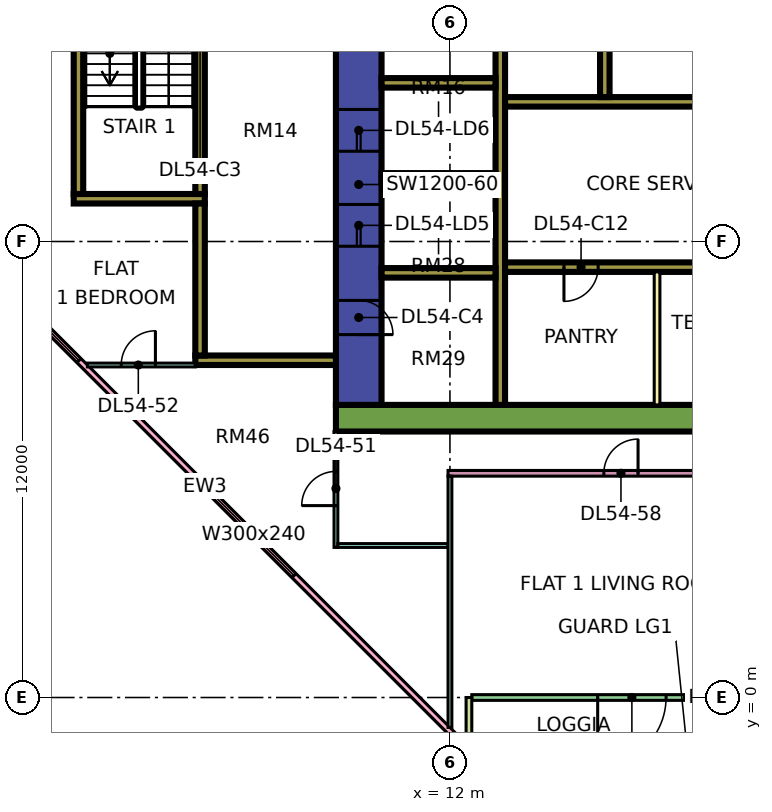
"""IFC4 building model, lengths in metres.
Left out: names, types, materials, properties, quantities, classifications, styles, units other than length and angle.
Written with IfcOpenShell. Run it as: python <this file> out.ifc"""

import sys

from ifc_helpers import new_model, si_unit, direction, frame, frame_2d, origin, place, context, subcontext, project, spatial, rectangle, extrude, element, fill, save


model = new_model("IFC4")
c1 = context("Model", 3, precision=1e-05, world=origin(), true_north=direction((0.0, 1.0)))
c2 = subcontext(c1, "Body", "Model", "MODEL_VIEW")
j1 = project(units=[si_unit("LENGTHUNIT", "METRE"), si_unit("PLANEANGLEUNIT", "RADIAN")], contexts=[c1])
p1 = place(None, origin())
s1 = spatial("IfcSite", under=j1, at=p1, CompositionType="ELEMENT")
p2 = place(p1, origin())
s2 = spatial("IfcBuilding", under=s1, at=p2, CompositionType="ELEMENT")
p3 = place(p2, frame((0.0, 0.0, 230.4)))
s3 = spatial("IfcBuildingStorey", under=s2, at=p3, CompositionType="ELEMENT", Elevation=230.4)
p4 = place(p3, frame((9.0, 7.35, 0.0), z_axis=(0.0, 0.0, 1.0), x_axis=(1.0, 0.0, 0.0)))
e1 = element("IfcWall", 1, at=p4, inside=s3, PredefinedType="SHEAR", context=c2, shape_type="SweptSolid", body=[
    extrude(rectangle(XDim=25.0, YDim=0.7, at=frame_2d((12.5, 0.0))), origin(), (0.0, 0.0, 1.0), 3.75),
])
p5 = place(p3, frame((9.6, 7.7, 0.0), z_axis=(0.0, 0.0, 1.0), x_axis=(0.0, 1.0, 0.0)))
e2 = element("IfcWall", 2, at=p5, inside=s3, PredefinedType="SHEAR", context=c2, shape_type="SweptSolid", body=[
    extrude(rectangle(XDim=11.6, YDim=1.2, at=frame_2d((5.8, 0.0))), origin(), (0.0, 0.0, 1.0), 3.75),
])
p6 = place(p5, frame((4.175, 0.0, 0.0)))
e3 = element("IfcOpeningElement", 3, at=p6, cuts=e2, PredefinedType="OPENING", context=c2, shape_type="SweptSolid", body=[
    extrude(rectangle(XDim=1.1, YDim=2.2, at=frame_2d((0.55, 1.1))), frame((0.0, 0.61, 0.0), z_axis=(0.0, -1.0, 0.0), x_axis=(1.0, 0.0, 0.0)), (0.0, 0.0, 1.0), 1.22),
])
p7 = place(p5, frame((6.675, 0.0, 0.0)))
e4 = element("IfcOpeningElement", 4, at=p7, cuts=e2, PredefinedType="OPENING", context=c2, shape_type="SweptSolid", body=[
    extrude(rectangle(XDim=1.1, YDim=2.2, at=frame_2d((0.55, 1.1))), frame((0.0, 0.61, 0.0), z_axis=(0.0, -1.0, 0.0), x_axis=(1.0, 0.0, 0.0)), (0.0, 0.0, 1.0), 1.22),
])
p8 = place(p5, frame((9.55, 0.0, 0.0)))
e5 = element("IfcOpeningElement", 5, at=p8, cuts=e2, PredefinedType="OPENING", context=c2, shape_type="SweptSolid", body=[
    extrude(rectangle(XDim=1.1, YDim=2.2, at=frame_2d((0.55, 1.1))), frame((0.0, 0.61, 0.0), z_axis=(0.0, -1.0, 0.0), x_axis=(1.0, 0.0, 0.0)), (0.0, 0.0, 1.0), 1.22),
])
p9 = place(p5, frame((1.85, 0.0, 0.0)))
e6 = element("IfcOpeningElement", 6, at=p9, cuts=e2, PredefinedType="OPENING", context=c2, shape_type="SweptSolid", body=[
    extrude(rectangle(XDim=0.9, YDim=2.1, at=frame_2d((0.45, 1.05))), frame((0.0, 0.61, 0.0), z_axis=(0.0, -1.0, 0.0), x_axis=(1.0, 0.0, 0.0)), (0.0, 0.0, 1.0), 1.22),
])
p10 = place(p3, frame((13.325, 7.7, 0.0), z_axis=(0.0, 0.0, 1.0), x_axis=(0.0, 1.0, 0.0)))
e7 = element("IfcWall", 7, at=p10, inside=s3, PredefinedType="SHEAR", context=c2, shape_type="SweptSolid", body=[
    extrude(rectangle(XDim=11.6, YDim=0.25, at=frame_2d((5.8, 0.0))), origin(), (0.0, 0.0, 1.0), 3.75),
])
p11 = place(p3, frame((13.45, 11.325, 0.0), z_axis=(0.0, 0.0, 1.0), x_axis=(1.0, 0.0, 0.0)))
e8 = element("IfcWall", 8, at=p11, inside=s3, PredefinedType="SHEAR", context=c2, shape_type="SweptSolid", body=[
    extrude(rectangle(XDim=19.85, YDim=0.25, at=frame_2d((9.925, 0.0))), origin(), (0.0, 0.0, 1.0), 3.75),
])
p12 = place(p11, frame((11.65, 0.0, 0.0)))
e9 = element("IfcOpeningElement", 9, at=p12, cuts=e8, PredefinedType="OPENING", context=c2, shape_type="SweptSolid", body=[
    extrude(rectangle(XDim=1.2, YDim=2.2, at=frame_2d((0.6, 1.1))), frame((0.0, 0.135, 0.0), z_axis=(0.0, -1.0, 0.0), x_axis=(1.0, 0.0, 0.0)), (0.0, 0.0, 1.0), 0.27),
])
p13 = place(p11, frame((14.4, 0.0, 0.0)))
e10 = element("IfcOpeningElement", 10, at=p13, cuts=e8, PredefinedType="OPENING", context=c2, shape_type="SweptSolid", body=[
    extrude(rectangle(XDim=1.2, YDim=2.2, at=frame_2d((0.6, 1.1))), frame((0.0, 0.135, 0.0), z_axis=(0.0, -1.0, 0.0), x_axis=(1.0, 0.0, 0.0)), (0.0, 0.0, 1.0), 0.27),
])
p14 = place(p11, frame((17.15, 0.0, 0.0)))
e11 = element("IfcOpeningElement", 11, at=p14, cuts=e8, PredefinedType="OPENING", context=c2, shape_type="SweptSolid", body=[
    extrude(rectangle(XDim=1.2, YDim=2.2, at=frame_2d((0.6, 1.1))), frame((0.0, 0.135, 0.0), z_axis=(0.0, -1.0, 0.0), x_axis=(1.0, 0.0, 0.0)), (0.0, 0.0, 1.0), 0.27),
])
p15 = place(p11, frame((1.55, 0.0, 0.0)))
e12 = element("IfcOpeningElement", 12, at=p15, cuts=e8, PredefinedType="OPENING", context=c2, shape_type="SweptSolid", body=[
    extrude(rectangle(XDim=0.9, YDim=2.1, at=frame_2d((0.45, 1.05))), frame((0.0, 0.135, 0.0), z_axis=(0.0, -1.0, 0.0), x_axis=(1.0, 0.0, 0.0)), (0.0, 0.0, 1.0), 0.27),
])
p16 = place(p11, frame((6.925, 0.0, 0.0)))
e13 = element("IfcOpeningElement", 13, at=p16, cuts=e8, PredefinedType="OPENING", context=c2, shape_type="SweptSolid", body=[
    extrude(rectangle(XDim=0.9, YDim=2.1, at=frame_2d((0.45, 1.05))), frame((0.0, 0.135, 0.0), z_axis=(0.0, -1.0, 0.0), x_axis=(1.0, 0.0, 0.0)), (0.0, 0.0, 1.0), 0.27),
])
p17 = place(p3, frame((13.45, 15.675, 0.0), z_axis=(0.0, 0.0, 1.0), x_axis=(1.0, 0.0, 0.0)))
e14 = element("IfcWall", 14, at=p17, inside=s3, PredefinedType="SHEAR", context=c2, shape_type="SweptSolid", body=[
    extrude(rectangle(XDim=13.75, YDim=0.25, at=frame_2d((6.875, 0.0))), origin(), (0.0, 0.0, 1.0), 3.75),
])
p18 = place(p17, frame((11.65, 0.0, 0.0)))
e15 = element("IfcOpeningElement", 15, at=p18, cuts=e14, PredefinedType="OPENING", context=c2, shape_type="SweptSolid", body=[
    extrude(rectangle(XDim=1.2, YDim=2.2, at=frame_2d((0.6, 1.1))), frame((0.0, 0.135, 0.0), z_axis=(0.0, -1.0, 0.0), x_axis=(1.0, 0.0, 0.0)), (0.0, 0.0, 1.0), 0.27),
])
for number, where, z_axis, x_axis in (
    (16, (10.2, 11.175, 0.0), (0.0, 0.0, 1.0), (1.0, 0.0, 0.0)),
    (17, (10.2, 13.675, 0.0), (0.0, 0.0, 1.0), (1.0, 0.0, 0.0)),
    (18, (10.2, 16.175, 0.0), (0.0, 0.0, 1.0), (1.0, 0.0, 0.0)),
):
    element("IfcWall", number, at=place(p3, frame(where, z_axis=z_axis, x_axis=x_axis)), inside=s3, PredefinedType="SHEAR", context=c2, shape_type="SweptSolid", body=[
        extrude(rectangle(XDim=3.0, YDim=0.25, at=frame_2d((1.5, 0.0))), origin(), (0.0, 0.0, 1.0), 3.75),
    ])
p19 = place(p3, frame((16.075, 15.8, 0.0), z_axis=(0.0, 0.0, 1.0), x_axis=(0.0, 1.0, 0.0)))
e19 = element("IfcWall", 19, at=p19, inside=s3, PredefinedType="SHEAR", context=c2, shape_type="SweptSolid", body=[
    extrude(rectangle(XDim=3.5, YDim=0.25, at=frame_2d((1.75, 0.0))), origin(), (0.0, 0.0, 1.0), 3.75),
])
p20 = place(p3, frame((2.1, 13.125, 0.0), z_axis=(0.0, 0.0, 1.0), x_axis=(1.0, 0.0, 0.0)))
e20 = element("IfcWall", 20, at=p20, inside=s3, PredefinedType="SHEAR", context=c2, shape_type="SweptSolid", body=[
    extrude(rectangle(XDim=3.45, YDim=0.25, at=frame_2d((1.725, 0.0))), origin(), (0.0, 0.0, 1.0), 3.75),
])
p21 = place(p3, frame((2.225, 13.25, 0.0), z_axis=(0.0, 0.0, 1.0), x_axis=(0.0, 1.0, 0.0)))
e21 = element("IfcWall", 21, at=p21, inside=s3, PredefinedType="SHEAR", context=c2, shape_type="SweptSolid", body=[
    extrude(rectangle(XDim=6.5, YDim=0.25, at=frame_2d((3.25, 0.0))), origin(), (0.0, 0.0, 1.0), 3.75),
])
p22 = place(p3, frame((5.425, 13.25, 0.0), z_axis=(0.0, 0.0, 1.0), x_axis=(0.0, 1.0, 0.0)))
e22 = element("IfcWall", 22, at=p22, inside=s3, PredefinedType="SHEAR", context=c2, shape_type="SweptSolid", body=[
    extrude(rectangle(XDim=6.5, YDim=0.25, at=frame_2d((3.25, 0.0))), origin(), (0.0, 0.0, 1.0), 3.75),
])
p23 = place(p22, frame((5.25, 0.0, 0.0)))
e23 = element("IfcOpeningElement", 23, at=p23, cuts=e22, PredefinedType="OPENING", context=c2, shape_type="SweptSolid", body=[
    extrude(rectangle(XDim=1.1, YDim=2.2, at=frame_2d((0.55, 1.1))), frame((0.0, 0.135, 0.0), z_axis=(0.0, -1.0, 0.0), x_axis=(1.0, 0.0, 0.0)), (0.0, 0.0, 1.0), 0.27),
])
p24 = place(p3, frame((5.3, 8.875, 0.0), z_axis=(0.0, 0.0, 1.0), x_axis=(1.0, 0.0, 0.0)))
e24 = element("IfcWall", 24, at=p24, inside=s3, PredefinedType="SHEAR", context=c2, shape_type="SweptSolid", body=[
    extrude(rectangle(XDim=3.7, YDim=0.25, at=frame_2d((1.85, 0.0))), origin(), (0.0, 0.0, 1.0), 3.75),
])
p25 = place(p3, frame((5.425, 9.0, 0.0), z_axis=(0.0, 0.0, 1.0), x_axis=(0.0, 1.0, 0.0)))
e25 = element("IfcWall", 25, at=p25, inside=s3, PredefinedType="SHEAR", context=c2, shape_type="SweptSolid", body=[
    extrude(rectangle(XDim=4.0, YDim=0.25, at=frame_2d((2.0, 0.0))), origin(), (0.0, 0.0, 1.0), 3.75),
])
p26 = place(p3, frame((-1.447, 12.553, 0.0), z_axis=(0.0, 0.0, 1.0), x_axis=(0.707106781187, -0.707106781187, 0.0)))
e26 = element("IfcWall", 26, at=p26, inside=s3, PredefinedType="SOLIDWALL", context=c2, shape_type="SweptSolid", body=[
    extrude(rectangle(XDim=19.799, YDim=0.15, at=frame_2d((9.899, 0.0))), origin(), (0.0, 0.0, 1.0), 3.35),
])
p27 = place(p26, frame((2.212, 0.0, 0.45)))
e27 = element("IfcOpeningElement", 27, at=p27, cuts=e26, PredefinedType="OPENING", context=c2, shape_type="SweptSolid", body=[
    extrude(rectangle(XDim=3.0, YDim=2.4, at=frame_2d((1.5, 1.2))), frame((0.0, 0.085, 0.0), z_axis=(0.0, -1.0, 0.0), x_axis=(1.0, 0.0, 0.0)), (0.0, 0.0, 1.0), 0.17),
])
p28 = place(p26, frame((10.216, 0.0, 0.45)))
e28 = element("IfcOpeningElement", 28, at=p28, cuts=e26, PredefinedType="OPENING", context=c2, shape_type="SweptSolid", body=[
    extrude(rectangle(XDim=3.0, YDim=2.4, at=frame_2d((1.5, 1.2))), frame((0.0, 0.085, 0.0), z_axis=(0.0, -1.0, 0.0), x_axis=(1.0, 0.0, 0.0)), (0.0, 0.0, 1.0), 0.17),
])
p29 = place(p3, frame((12.575, 0.0, 0.0), z_axis=(0.0, 0.0, 1.0), x_axis=(1.0, 0.0, 0.0)))
e29 = element("IfcWall", 29, at=p29, inside=s3, PredefinedType="SOLIDWALL", context=c2, shape_type="SweptSolid", body=[
    extrude(rectangle(XDim=11.35, YDim=0.15, at=frame_2d((5.675, 0.0))), origin(), (0.0, 0.0, 1.0), 3.35),
])
p30 = place(p29, frame((3.312, 0.0, 0.0)))
e30 = element("IfcOpeningElement", 30, at=p30, cuts=e29, PredefinedType="OPENING", context=c2, shape_type="SweptSolid", body=[
    extrude(rectangle(XDim=1.8, YDim=2.4, at=frame_2d((0.9, 1.2))), frame((0.0, 0.085, 0.0), z_axis=(0.0, -1.0, 0.0), x_axis=(1.0, 0.0, 0.0)), (0.0, 0.0, 1.0), 0.17),
])
p31 = place(p29, frame((9.062, 0.0, 0.45)))
e31 = element("IfcOpeningElement", 31, at=p31, cuts=e29, PredefinedType="OPENING", context=c2, shape_type="SweptSolid", body=[
    extrude(rectangle(XDim=1.2, YDim=2.4, at=frame_2d((0.6, 1.2))), frame((0.0, 0.085, 0.0), z_axis=(0.0, -1.0, 0.0), x_axis=(1.0, 0.0, 0.0)), (0.0, 0.0, 1.0), 0.17),
])
p32 = place(p3, frame((12.5, -1.5, 0.0), z_axis=(0.0, 0.0, 1.0), x_axis=(0.0, 1.0, 0.0)))
e32 = element("IfcWall", 32, at=p32, inside=s3, PredefinedType="SOLIDWALL", context=c2, shape_type="SweptSolid", body=[
    extrude(rectangle(XDim=1.5, YDim=0.15, at=frame_2d((0.75, 0.0))), origin(), (0.0, 0.0, 1.0), 3.35),
])
p33 = place(p3, frame((17.45, 7.7, 0.0), z_axis=(0.0, 0.0, 1.0), x_axis=(0.0, 1.0, 0.0)))
e33 = element("IfcWall", 33, at=p33, inside=s3, PredefinedType="PARTITIONING", context=c2, shape_type="SweptSolid", body=[
    extrude(rectangle(XDim=3.5, YDim=0.15, at=frame_2d((1.75, 0.0))), origin(), (0.0, 0.0, 1.0), 3.35),
])
p34 = place(p3, frame((2.461, 8.75, 0.0), z_axis=(0.0, 0.0, 1.0), x_axis=(1.0, 0.0, 0.0)))
e34 = element("IfcWall", 34, at=p34, inside=s3, PredefinedType="PARTITIONING", context=c2, shape_type="SweptSolid", body=[
    extrude(rectangle(XDim=2.839, YDim=0.1, at=frame_2d((1.419, 0.0))), origin(), (0.0, 0.0, 1.0), 3.35),
])
p35 = place(p34, frame((0.889, 0.0, 0.0)))
e35 = element("IfcOpeningElement", 35, at=p35, cuts=e34, PredefinedType="OPENING", context=c2, shape_type="SweptSolid", body=[
    extrude(rectangle(XDim=0.9, YDim=2.1, at=frame_2d((0.45, 1.05))), frame((0.0, 0.06, 0.0), z_axis=(0.0, -1.0, 0.0), x_axis=(1.0, 0.0, 0.0)), (0.0, 0.0, 1.0), 0.12),
])
p36 = place(p3, frame((9.0, 3.95, 0.0), z_axis=(0.0, 0.0, 1.0), x_axis=(0.0, 1.0, 0.0)))
e36 = element("IfcWall", 36, at=p36, inside=s3, PredefinedType="PARTITIONING", context=c2, shape_type="SweptSolid", body=[
    extrude(rectangle(XDim=3.05, YDim=0.1, at=frame_2d((1.525, 0.0))), origin(), (0.0, 0.0, 1.0), 3.35),
])
p37 = place(p36, frame((1.1, 0.0, 0.0)))
e37 = element("IfcOpeningElement", 37, at=p37, cuts=e36, PredefinedType="OPENING", context=c2, shape_type="SweptSolid", body=[
    extrude(rectangle(XDim=0.9, YDim=2.1, at=frame_2d((0.45, 1.05))), frame((0.0, 0.06, 0.0), z_axis=(0.0, -1.0, 0.0), x_axis=(1.0, 0.0, 0.0)), (0.0, 0.0, 1.0), 0.12),
])
p38 = place(p3, frame((9.05, 4.0, 0.0), z_axis=(0.0, 0.0, 1.0), x_axis=(1.0, 0.0, 0.0)))
e38 = element("IfcWall", 38, at=p38, inside=s3, PredefinedType="PARTITIONING", context=c2, shape_type="SweptSolid", body=[
    extrude(rectangle(XDim=2.9, YDim=0.1, at=frame_2d((1.45, 0.0))), origin(), (0.0, 0.0, 1.0), 3.35),
])
p39 = place(p3, frame((11.95, 5.9, 0.0), z_axis=(0.0, 0.0, 1.0), x_axis=(1.0, 0.0, 0.0)))
e39 = element("IfcWall", 39, at=p39, inside=s3, PredefinedType="PARTITIONING", context=c2, shape_type="SweptSolid", body=[
    extrude(rectangle(XDim=21.1, YDim=0.15, at=frame_2d((10.55, 0.0))), origin(), (0.0, 0.0, 1.0), 3.35),
])
p40 = place(p39, frame((10.1, 0.0, 0.0)))
e40 = element("IfcOpeningElement", 40, at=p40, cuts=e39, PredefinedType="OPENING", context=c2, shape_type="SweptSolid", body=[
    extrude(rectangle(XDim=0.9, YDim=2.1, at=frame_2d((0.45, 1.05))), frame((0.0, 0.085, 0.0), z_axis=(0.0, -1.0, 0.0), x_axis=(1.0, 0.0, 0.0)), (0.0, 0.0, 1.0), 0.17),
])
p41 = place(p39, frame((16.1, 0.0, 0.0)))
e41 = element("IfcOpeningElement", 41, at=p41, cuts=e39, PredefinedType="OPENING", context=c2, shape_type="SweptSolid", body=[
    extrude(rectangle(XDim=0.9, YDim=2.1, at=frame_2d((0.45, 1.05))), frame((0.0, 0.085, 0.0), z_axis=(0.0, -1.0, 0.0), x_axis=(1.0, 0.0, 0.0)), (0.0, 0.0, 1.0), 0.17),
])
p42 = place(p39, frame((4.1, 0.0, 0.0)))
e42 = element("IfcOpeningElement", 42, at=p42, cuts=e39, PredefinedType="OPENING", context=c2, shape_type="SweptSolid", body=[
    extrude(rectangle(XDim=0.9, YDim=2.1, at=frame_2d((0.45, 1.05))), frame((0.0, 0.085, 0.0), z_axis=(0.0, -1.0, 0.0), x_axis=(1.0, 0.0, 0.0)), (0.0, 0.0, 1.0), 0.17),
])
p43 = place(p3, frame((12.0, -0.788, 0.0), z_axis=(0.0, 0.0, 1.0), x_axis=(0.0, 1.0, 0.0)))
e43 = element("IfcWall", 43, at=p43, inside=s3, PredefinedType="PARTITIONING", context=c2, shape_type="SweptSolid", body=[
    extrude(rectangle(XDim=6.613, YDim=0.1, at=frame_2d((3.306, 0.0))), origin(), (0.0, 0.0, 1.0), 3.35),
])
p44 = place(p27, origin())
e44 = element("IfcWindow", 44, at=p44, inside=s3, PartitioningType="SINGLE_PANEL", PredefinedType="WINDOW", context=c2, shape_type="SweptSolid", body=[
    extrude(rectangle(XDim=3.0, YDim=2.4, at=frame_2d((1.5, 1.2))), frame((0.0, 0.03, 0.0), z_axis=(0.0, -1.0, 0.0), x_axis=(1.0, 0.0, 0.0)), (0.0, 0.0, 1.0), 0.06),
])
fill(e27, e44)
p45 = place(p28, origin())
e45 = element("IfcWindow", 45, at=p45, inside=s3, PartitioningType="SINGLE_PANEL", PredefinedType="WINDOW", context=c2, shape_type="SweptSolid", body=[
    extrude(rectangle(XDim=3.0, YDim=2.4, at=frame_2d((1.5, 1.2))), frame((0.0, 0.03, 0.0), z_axis=(0.0, -1.0, 0.0), x_axis=(1.0, 0.0, 0.0)), (0.0, 0.0, 1.0), 0.06),
])
fill(e28, e45)
p46 = place(p30, frame((1.8, 0.0, 0.0), z_axis=(0.0, 0.0, 1.0), x_axis=(-1.0, 0.0, 0.0)))
e46 = element("IfcDoor", 46, at=p46, inside=s3, OperationType="DOUBLE_DOOR_SINGLE_SWING", PredefinedType="DOOR", context=c2, shape_type="SweptSolid", body=[
    extrude(rectangle(XDim=1.8, YDim=2.4, at=frame_2d((0.9, 1.2))), frame((0.0, 0.025, 0.0), z_axis=(0.0, -1.0, 0.0), x_axis=(1.0, 0.0, 0.0)), (0.0, 0.0, 1.0), 0.05),
])
fill(e30, e46)
p47 = place(p6, origin())
e47 = element("IfcDoor", 47, at=p47, inside=s3, OperationType="DOUBLE_DOOR_SLIDING", PredefinedType="DOOR", context=c2, shape_type="SweptSolid", body=[
    extrude(rectangle(XDim=1.1, YDim=2.2, at=frame_2d((0.55, 1.1))), frame((0.0, 0.025, 0.0), z_axis=(0.0, -1.0, 0.0), x_axis=(1.0, 0.0, 0.0)), (0.0, 0.0, 1.0), 0.05),
])
fill(e3, e47)
p48 = place(p7, origin())
e48 = element("IfcDoor", 48, at=p48, inside=s3, OperationType="DOUBLE_DOOR_SLIDING", PredefinedType="DOOR", context=c2, shape_type="SweptSolid", body=[
    extrude(rectangle(XDim=1.1, YDim=2.2, at=frame_2d((0.55, 1.1))), frame((0.0, 0.025, 0.0), z_axis=(0.0, -1.0, 0.0), x_axis=(1.0, 0.0, 0.0)), (0.0, 0.0, 1.0), 0.05),
])
fill(e4, e48)
p49 = place(p9, frame((0.9, 0.0, 0.0), z_axis=(0.0, 0.0, 1.0), x_axis=(-1.0, 0.0, 0.0)))
e49 = element("IfcDoor", 49, at=p49, inside=s3, OperationType="SINGLE_SWING_LEFT", PredefinedType="DOOR", context=c2, shape_type="SweptSolid", body=[
    extrude(rectangle(XDim=0.9, YDim=2.1, at=frame_2d((0.45, 1.05))), frame((0.0, 0.025, 0.0), z_axis=(0.0, -1.0, 0.0), x_axis=(1.0, 0.0, 0.0)), (0.0, 0.0, 1.0), 0.05),
])
fill(e6, e49)
p50 = place(p15, frame((0.9, 0.0, 0.0), z_axis=(0.0, 0.0, 1.0), x_axis=(-1.0, 0.0, 0.0)))
e50 = element("IfcDoor", 50, at=p50, inside=s3, OperationType="SINGLE_SWING_LEFT", PredefinedType="DOOR", context=c2, shape_type="SweptSolid", body=[
    extrude(rectangle(XDim=0.9, YDim=2.1, at=frame_2d((0.45, 1.05))), frame((0.0, 0.025, 0.0), z_axis=(0.0, -1.0, 0.0), x_axis=(1.0, 0.0, 0.0)), (0.0, 0.0, 1.0), 0.05),
])
fill(e12, e50)
p51 = place(p37, origin())
e51 = element("IfcDoor", 51, at=p51, inside=s3, OperationType="SINGLE_SWING_LEFT", PredefinedType="DOOR", context=c2, shape_type="SweptSolid", body=[
    extrude(rectangle(XDim=0.9, YDim=2.1, at=frame_2d((0.45, 1.05))), frame((0.0, 0.025, 0.0), z_axis=(0.0, -1.0, 0.0), x_axis=(1.0, 0.0, 0.0)), (0.0, 0.0, 1.0), 0.05),
])
fill(e37, e51)
p52 = place(p35, frame((0.9, 0.0, 0.0), z_axis=(0.0, 0.0, 1.0), x_axis=(-1.0, 0.0, 0.0)))
e52 = element("IfcDoor", 52, at=p52, inside=s3, OperationType="SINGLE_SWING_RIGHT", PredefinedType="DOOR", context=c2, shape_type="SweptSolid", body=[
    extrude(rectangle(XDim=0.9, YDim=2.1, at=frame_2d((0.45, 1.05))), frame((0.0, 0.025, 0.0), z_axis=(0.0, -1.0, 0.0), x_axis=(1.0, 0.0, 0.0)), (0.0, 0.0, 1.0), 0.05),
])
fill(e35, e52)
p53 = place(p42, frame((0.9, 0.0, 0.0), z_axis=(0.0, 0.0, 1.0), x_axis=(-1.0, 0.0, 0.0)))
e53 = element("IfcDoor", 53, at=p53, inside=s3, OperationType="SINGLE_SWING_RIGHT", PredefinedType="DOOR", context=c2, shape_type="SweptSolid", body=[
    extrude(rectangle(XDim=0.9, YDim=2.1, at=frame_2d((0.45, 1.05))), frame((0.0, 0.025, 0.0), z_axis=(0.0, -1.0, 0.0), x_axis=(1.0, 0.0, 0.0)), (0.0, 0.0, 1.0), 0.05),
])
fill(e42, e53)
save(model, sys.argv[1])
